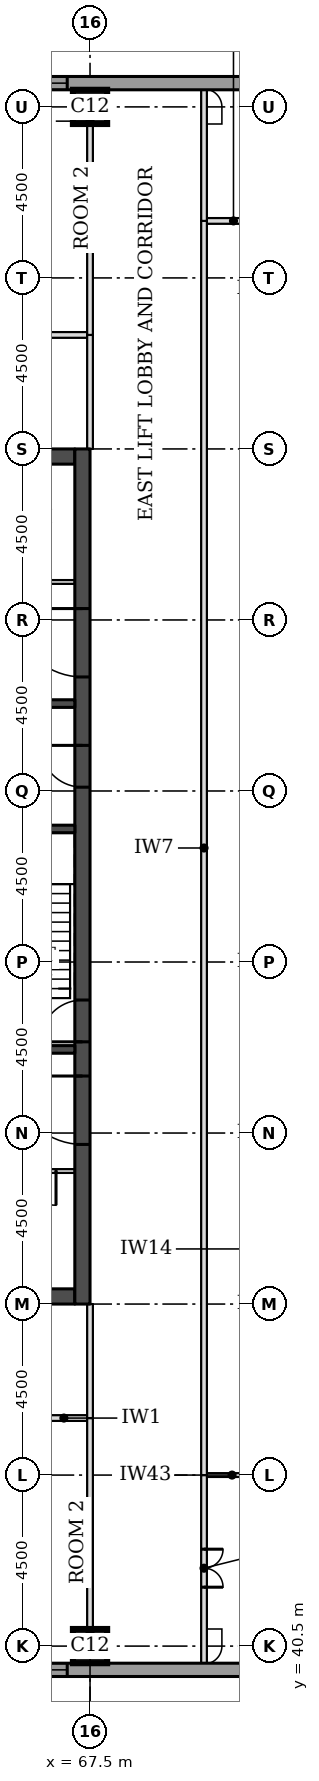
"""IFC4 building model, lengths in metres.
Left out: names, types, materials, properties, quantities, classifications, styles, units other than length and angle.
Written with IfcOpenShell. Run it as: python <this file> out.ifc"""

import sys

from ifc_helpers import new_model, si_unit, direction, frame, frame_2d, origin, origin_2d, place, context, subcontext, project, spatial, rectangle, extrude, element, fill, save


model = new_model("IFC4")
c1 = context("Model", 3, precision=1e-05, world=origin(), true_north=direction((0.0, 1.0)))
c2 = subcontext(c1, "Body", "Model", "MODEL_VIEW")
j1 = project(units=[si_unit("LENGTHUNIT", "METRE"), si_unit("PLANEANGLEUNIT", "RADIAN")], contexts=[c1])
p1 = place(None, origin())
s1 = spatial("IfcSite", under=j1, at=p1, CompositionType="ELEMENT")
p2 = place(p1, origin())
s2 = spatial("IfcBuilding", under=s1, at=p2, CompositionType="ELEMENT")
p3 = place(p2, frame((0.0, 0.0, 147.7)))
s3 = spatial("IfcBuildingStorey", under=s2, at=p3, CompositionType="ELEMENT", Elevation=147.7)
for number, where, z_axis, x_axis in (
    (1, (67.5, 40.5, 0.0), (0.0, 0.0, 1.0), (1.0, 0.0, 0.0)),
    (2, (67.5, 81.0, 0.0), (0.0, 0.0, 1.0), (1.0, 0.0, 0.0)),
):
    element("IfcColumn", number, at=place(p3, frame(where, z_axis=z_axis, x_axis=x_axis)), inside=s3, PredefinedType="COLUMN", context=c2, shape_type="SweptSolid", body=[
        extrude(rectangle(XDim=0.9, YDim=0.9, at=origin_2d()), origin(), (0.0, 0.0, 1.0), 3.7),
    ])
for number, where, z_axis, x_axis in (
    (3, (45.4, 49.7, 0.0), (0.0, 0.0, 1.0), (1.0, 0.0, 0.0)),
    (4, (45.4, 71.8, 0.0), (0.0, 0.0, 1.0), (1.0, 0.0, 0.0)),
):
    element("IfcWall", number, at=place(p3, frame(where, z_axis=z_axis, x_axis=x_axis)), inside=s3, PredefinedType="SHEAR", context=c2, shape_type="SweptSolid", body=[
        extrude(rectangle(XDim=21.7, YDim=0.4, at=frame_2d((10.85, 0.0))), origin(), (0.0, 0.0, 1.0), 3.7),
    ])
p4 = place(p3, frame((67.3, 49.5, 0.0), z_axis=(0.0, 0.0, 1.0), x_axis=(0.0, 1.0, 0.0)))
e5 = element("IfcWall", 5, at=p4, inside=s3, PredefinedType="SHEAR", context=c2, shape_type="SweptSolid", body=[
    extrude(rectangle(XDim=22.5, YDim=0.4, at=frame_2d((11.25, 0.0))), origin(), (0.0, 0.0, 1.0), 3.7),
])
p5 = place(p4, frame((4.2, 0.0, 0.0)))
e6 = element("IfcOpeningElement", 6, at=p5, cuts=e5, PredefinedType="OPENING", context=c2, shape_type="SweptSolid", body=[
    extrude(rectangle(XDim=1.8, YDim=2.1, at=frame_2d((0.9, 1.05))), frame((0.0, 0.21, 0.0), z_axis=(0.0, -1.0, 0.0), x_axis=(1.0, 0.0, 0.0)), (0.0, 0.0, 1.0), 0.42),
])
p6 = place(p4, frame((6.9, 0.0, 0.0)))
e7 = element("IfcOpeningElement", 7, at=p6, cuts=e5, PredefinedType="OPENING", context=c2, shape_type="SweptSolid", body=[
    extrude(rectangle(XDim=1.1, YDim=2.1, at=frame_2d((0.55, 1.05))), frame((0.0, 0.21, 0.0), z_axis=(0.0, -1.0, 0.0), x_axis=(1.0, 0.0, 0.0)), (0.0, 0.0, 1.0), 0.42),
])
p7 = place(p4, frame((13.6, 0.0, 0.0)))
e8 = element("IfcOpeningElement", 8, at=p7, cuts=e5, PredefinedType="OPENING", context=c2, shape_type="SweptSolid", body=[
    extrude(rectangle(XDim=1.1, YDim=2.1, at=frame_2d((0.55, 1.05))), frame((0.0, 0.21, 0.0), z_axis=(0.0, -1.0, 0.0), x_axis=(1.0, 0.0, 0.0)), (0.0, 0.0, 1.0), 0.42),
])
p8 = place(p4, frame((16.5, 0.0, 0.0)))
e9 = element("IfcOpeningElement", 9, at=p8, cuts=e5, PredefinedType="OPENING", context=c2, shape_type="SweptSolid", body=[
    extrude(rectangle(XDim=1.8, YDim=2.1, at=frame_2d((0.9, 1.05))), frame((0.0, 0.21, 0.0), z_axis=(0.0, -1.0, 0.0), x_axis=(1.0, 0.0, 0.0)), (0.0, 0.0, 1.0), 0.42),
])
p9 = place(p3, frame((36.0, 39.875, 0.0), z_axis=(0.0, 0.0, 1.0), x_axis=(1.0, 0.0, 0.0)))
e10 = element("IfcWall", 10, at=p9, inside=s3, PredefinedType="STANDARD", context=c2, shape_type="SweptSolid", body=[
    extrude(rectangle(XDim=36.331, YDim=0.35, at=frame_2d((18.166, 0.0))), origin(), (0.0, 0.0, 1.0), 3.525),
])
p10 = place(p9, frame((5.1, 0.0, 0.9)))
e11 = element("IfcOpeningElement", 11, at=p10, cuts=e10, PredefinedType="OPENING", context=c2, shape_type="SweptSolid", body=[
    extrude(rectangle(XDim=3.3, YDim=1.9, at=frame_2d((1.65, 0.95))), frame((0.0, 0.185, 0.0), z_axis=(0.0, -1.0, 0.0), x_axis=(1.0, 0.0, 0.0)), (0.0, 0.0, 1.0), 0.37),
])
p11 = place(p9, frame((9.6, 0.0, 0.9)))
e12 = element("IfcOpeningElement", 12, at=p11, cuts=e10, PredefinedType="OPENING", context=c2, shape_type="SweptSolid", body=[
    extrude(rectangle(XDim=3.3, YDim=1.9, at=frame_2d((1.65, 0.95))), frame((0.0, 0.185, 0.0), z_axis=(0.0, -1.0, 0.0), x_axis=(1.0, 0.0, 0.0)), (0.0, 0.0, 1.0), 0.37),
])
p12 = place(p9, frame((14.1, 0.0, 0.9)))
e13 = element("IfcOpeningElement", 13, at=p12, cuts=e10, PredefinedType="OPENING", context=c2, shape_type="SweptSolid", body=[
    extrude(rectangle(XDim=3.3, YDim=1.9, at=frame_2d((1.65, 0.95))), frame((0.0, 0.185, 0.0), z_axis=(0.0, -1.0, 0.0), x_axis=(1.0, 0.0, 0.0)), (0.0, 0.0, 1.0), 0.37),
])
p13 = place(p9, frame((18.6, 0.0, 0.9)))
e14 = element("IfcOpeningElement", 14, at=p13, cuts=e10, PredefinedType="OPENING", context=c2, shape_type="SweptSolid", body=[
    extrude(rectangle(XDim=3.3, YDim=1.9, at=frame_2d((1.65, 0.95))), frame((0.0, 0.185, 0.0), z_axis=(0.0, -1.0, 0.0), x_axis=(1.0, 0.0, 0.0)), (0.0, 0.0, 1.0), 0.37),
])
p14 = place(p9, frame((23.1, 0.0, 0.9)))
e15 = element("IfcOpeningElement", 15, at=p14, cuts=e10, PredefinedType="OPENING", context=c2, shape_type="SweptSolid", body=[
    extrude(rectangle(XDim=3.3, YDim=1.9, at=frame_2d((1.65, 0.95))), frame((0.0, 0.185, 0.0), z_axis=(0.0, -1.0, 0.0), x_axis=(1.0, 0.0, 0.0)), (0.0, 0.0, 1.0), 0.37),
])
p15 = place(p9, frame((27.6, 0.0, 0.9)))
e16 = element("IfcOpeningElement", 16, at=p15, cuts=e10, PredefinedType="OPENING", context=c2, shape_type="SweptSolid", body=[
    extrude(rectangle(XDim=3.3, YDim=1.9, at=frame_2d((1.65, 0.95))), frame((0.0, 0.185, 0.0), z_axis=(0.0, -1.0, 0.0), x_axis=(1.0, 0.0, 0.0)), (0.0, 0.0, 1.0), 0.37),
])
p16 = place(p3, frame((72.331, 81.625, 0.0), z_axis=(0.0, 0.0, 1.0), x_axis=(-1.0, 0.0, 0.0)))
e17 = element("IfcWall", 17, at=p16, inside=s3, PredefinedType="STANDARD", context=c2, shape_type="SweptSolid", body=[
    extrude(rectangle(XDim=32.163, YDim=0.35, at=frame_2d((16.081, 0.0))), origin(), (0.0, 0.0, 1.0), 3.525),
])
p17 = place(p16, frame((5.431, 0.0, 0.9)))
e18 = element("IfcOpeningElement", 18, at=p17, cuts=e17, PredefinedType="OPENING", context=c2, shape_type="SweptSolid", body=[
    extrude(rectangle(XDim=3.3, YDim=1.9, at=frame_2d((1.65, 0.95))), frame((0.0, 0.185, 0.0), z_axis=(0.0, -1.0, 0.0), x_axis=(1.0, 0.0, 0.0)), (0.0, 0.0, 1.0), 0.37),
])
p18 = place(p16, frame((9.931, 0.0, 0.9)))
e19 = element("IfcOpeningElement", 19, at=p18, cuts=e17, PredefinedType="OPENING", context=c2, shape_type="SweptSolid", body=[
    extrude(rectangle(XDim=3.3, YDim=1.9, at=frame_2d((1.65, 0.95))), frame((0.0, 0.185, 0.0), z_axis=(0.0, -1.0, 0.0), x_axis=(1.0, 0.0, 0.0)), (0.0, 0.0, 1.0), 0.37),
])
p19 = place(p16, frame((14.431, 0.0, 0.9)))
e20 = element("IfcOpeningElement", 20, at=p19, cuts=e17, PredefinedType="OPENING", context=c2, shape_type="SweptSolid", body=[
    extrude(rectangle(XDim=3.3, YDim=1.9, at=frame_2d((1.65, 0.95))), frame((0.0, 0.185, 0.0), z_axis=(0.0, -1.0, 0.0), x_axis=(1.0, 0.0, 0.0)), (0.0, 0.0, 1.0), 0.37),
])
p20 = place(p16, frame((18.931, 0.0, 0.9)))
e21 = element("IfcOpeningElement", 21, at=p20, cuts=e17, PredefinedType="OPENING", context=c2, shape_type="SweptSolid", body=[
    extrude(rectangle(XDim=3.3, YDim=1.9, at=frame_2d((1.65, 0.95))), frame((0.0, 0.185, 0.0), z_axis=(0.0, -1.0, 0.0), x_axis=(1.0, 0.0, 0.0)), (0.0, 0.0, 1.0), 0.37),
])
p21 = place(p16, frame((23.431, 0.0, 0.9)))
e22 = element("IfcOpeningElement", 22, at=p21, cuts=e17, PredefinedType="OPENING", context=c2, shape_type="SweptSolid", body=[
    extrude(rectangle(XDim=3.3, YDim=1.9, at=frame_2d((1.65, 0.95))), frame((0.0, 0.185, 0.0), z_axis=(0.0, -1.0, 0.0), x_axis=(1.0, 0.0, 0.0)), (0.0, 0.0, 1.0), 0.37),
])
p22 = place(p3, frame((70.575, 45.0, 0.0), z_axis=(0.0, 0.0, 1.0), x_axis=(1.0, 0.0, 0.0)))
e23 = element("IfcWall", 23, at=p22, inside=s3, PredefinedType="PARTITIONING", context=c2, shape_type="SweptSolid", body=[
    extrude(rectangle(XDim=2.925, YDim=0.1, at=frame_2d((1.462, 0.0))), origin(), (0.0, 0.0, 1.0), 3.096),
])
p23 = place(p22, frame((1.0, 0.0, 0.0)))
e24 = element("IfcOpeningElement", 24, at=p23, cuts=e23, PredefinedType="OPENING", context=c2, shape_type="SweptSolid", body=[
    extrude(rectangle(XDim=0.9, YDim=2.1, at=frame_2d((0.45, 1.05))), frame((0.0, 0.06, 0.0), z_axis=(0.0, -1.0, 0.0), x_axis=(1.0, 0.0, 0.0)), (0.0, 0.0, 1.0), 0.12),
])
p24 = place(p3, frame((63.0, 46.5, 0.0), z_axis=(0.0, 0.0, 1.0), x_axis=(1.0, 0.0, 0.0)))
e25 = element("IfcWall", 25, at=p24, inside=s3, PredefinedType="PARTITIONING", context=c2, shape_type="SweptSolid", body=[
    extrude(rectangle(XDim=4.425, YDim=0.15, at=frame_2d((2.212, 0.0))), origin(), (0.0, 0.0, 1.0), 3.55),
])
p25 = place(p24, frame((1.75, 0.0, 0.0)))
e26 = element("IfcOpeningElement", 26, at=p25, cuts=e25, PredefinedType="OPENING", context=c2, shape_type="SweptSolid", body=[
    extrude(rectangle(XDim=0.9, YDim=2.1, at=frame_2d((0.45, 1.05))), frame((0.0, 0.085, 0.0), z_axis=(0.0, -1.0, 0.0), x_axis=(1.0, 0.0, 0.0)), (0.0, 0.0, 1.0), 0.17),
])
p26 = place(p3, frame((63.0, 75.0, 0.0), z_axis=(0.0, 0.0, 1.0), x_axis=(1.0, 0.0, 0.0)))
e27 = element("IfcWall", 27, at=p26, inside=s3, PredefinedType="PARTITIONING", context=c2, shape_type="SweptSolid", body=[
    extrude(rectangle(XDim=4.425, YDim=0.15, at=frame_2d((2.212, 0.0))), origin(), (0.0, 0.0, 1.0), 3.55),
])
p27 = place(p26, frame((1.75, 0.0, 0.0)))
e28 = element("IfcOpeningElement", 28, at=p27, cuts=e27, PredefinedType="OPENING", context=c2, shape_type="SweptSolid", body=[
    extrude(rectangle(XDim=0.9, YDim=2.1, at=frame_2d((0.45, 1.05))), frame((0.0, 0.085, 0.0), z_axis=(0.0, -1.0, 0.0), x_axis=(1.0, 0.0, 0.0)), (0.0, 0.0, 1.0), 0.17),
])
p28 = place(p3, frame((70.575, 78.0, 0.0), z_axis=(0.0, 0.0, 1.0), x_axis=(1.0, 0.0, 0.0)))
e29 = element("IfcWall", 29, at=p28, inside=s3, PredefinedType="PARTITIONING", context=c2, shape_type="SweptSolid", body=[
    extrude(rectangle(XDim=3.0, YDim=0.15, at=frame_2d((1.5, 0.0))), origin(), (0.0, 0.0, 1.0), 3.55),
])
p29 = place(p28, frame((1.05, 0.0, 0.0)))
e30 = element("IfcOpeningElement", 30, at=p29, cuts=e29, PredefinedType="OPENING", context=c2, shape_type="SweptSolid", body=[
    extrude(rectangle(XDim=0.9, YDim=2.1, at=frame_2d((0.45, 1.05))), frame((0.0, 0.085, 0.0), z_axis=(0.0, -1.0, 0.0), x_axis=(1.0, 0.0, 0.0)), (0.0, 0.0, 1.0), 0.17),
])
p30 = place(p3, frame((67.5, 40.05, 0.0), z_axis=(0.0, 0.0, 1.0), x_axis=(0.0, 1.0, 0.0)))
e31 = element("IfcWall", 31, at=p30, inside=s3, PredefinedType="PARTITIONING", context=c2, shape_type="SweptSolid", body=[
    extrude(rectangle(XDim=6.45, YDim=0.15, at=frame_2d((3.225, 0.0))), origin(), (0.0, 0.0, 1.0), 3.022),
])
p31 = place(p3, frame((70.5, 40.05, 0.0), z_axis=(0.0, 0.0, 1.0), x_axis=(0.0, 1.0, 0.0)))
e32 = element("IfcWall", 32, at=p31, inside=s3, PredefinedType="PARTITIONING", context=c2, shape_type="SweptSolid", body=[
    extrude(rectangle(XDim=4.95, YDim=0.15, at=frame_2d((2.475, 0.0))), origin(), (0.0, 0.0, 1.0), 3.55),
])
p32 = place(p31, frame((2.0, 0.0, 0.0)))
e33 = element("IfcOpeningElement", 33, at=p32, cuts=e32, PredefinedType="OPENING", context=c2, shape_type="SweptSolid", body=[
    extrude(rectangle(XDim=1.0, YDim=2.1, at=frame_2d((0.5, 1.05))), frame((0.0, 0.085, 0.0), z_axis=(0.0, -1.0, 0.0), x_axis=(1.0, 0.0, 0.0)), (0.0, 0.0, 1.0), 0.17),
])
p33 = place(p3, frame((70.5, 45.0, 0.0), z_axis=(0.0, 0.0, 1.0), x_axis=(0.0, 1.0, 0.0)))
e34 = element("IfcWall", 34, at=p33, inside=s3, PredefinedType="PARTITIONING", context=c2, shape_type="SweptSolid", body=[
    extrude(rectangle(XDim=33.0, YDim=0.15, at=frame_2d((16.5, 0.0))), origin(), (0.0, 0.0, 1.0), 3.55),
])
for number, where, z_axis, x_axis in (
    (35, (67.5, 46.5, 0.0), (0.0, 0.0, 1.0), (0.0, 1.0, 0.0)),
    (36, (67.5, 72.0, 0.0), (0.0, 0.0, 1.0), (0.0, 1.0, 0.0)),
):
    element("IfcWall", number, at=place(p3, frame(where, z_axis=z_axis, x_axis=x_axis)), inside=s3, PredefinedType="PARTITIONING", context=c2, shape_type="SweptSolid", body=[
        extrude(rectangle(XDim=3.0, YDim=0.15, at=frame_2d((1.5, 0.0))), origin(), (0.0, 0.0, 1.0), 3.022),
    ])
p34 = place(p3, frame((67.5, 75.0, 0.0), z_axis=(0.0, 0.0, 1.0), x_axis=(0.0, 1.0, 0.0)))
e37 = element("IfcWall", 37, at=p34, inside=s3, PredefinedType="PARTITIONING", context=c2, shape_type="SweptSolid", body=[
    extrude(rectangle(XDim=6.45, YDim=0.15, at=frame_2d((3.225, 0.0))), origin(), (0.0, 0.0, 1.0), 3.022),
])
p35 = place(p3, frame((70.5, 78.0, 0.0), z_axis=(0.0, 0.0, 1.0), x_axis=(0.0, 1.0, 0.0)))
e38 = element("IfcWall", 38, at=p35, inside=s3, PredefinedType="PARTITIONING", context=c2, shape_type="SweptSolid", body=[
    extrude(rectangle(XDim=3.45, YDim=0.15, at=frame_2d((1.725, 0.0))), origin(), (0.0, 0.0, 1.0), 3.55),
])
p36 = place(p3, frame((45.4, 53.0, 0.0), z_axis=(0.0, 0.0, 1.0), x_axis=(1.0, 0.0, 0.0)))
e39 = element("IfcWall", 39, at=p36, inside=s3, PredefinedType="PARTITIONING", context=c2, shape_type="SweptSolid", body=[
    extrude(rectangle(XDim=21.7, YDim=0.1, at=frame_2d((10.85, 0.0))), origin(), (0.0, 0.0, 1.0), 3.55),
])
p37 = place(p36, frame((20.305, 0.0, 0.0)))
e40 = element("IfcOpeningElement", 40, at=p37, cuts=e39, PredefinedType="OPENING", context=c2, shape_type="SweptSolid", body=[
    extrude(rectangle(XDim=0.9, YDim=2.1, at=frame_2d((0.45, 1.05))), frame((0.0, 0.06, 0.0), z_axis=(0.0, -1.0, 0.0), x_axis=(1.0, 0.0, 0.0)), (0.0, 0.0, 1.0), 0.12),
])
p38 = place(p36, frame((17.68, 0.0, 0.0)))
e41 = element("IfcOpeningElement", 41, at=p38, cuts=e39, PredefinedType="OPENING", context=c2, shape_type="SweptSolid", body=[
    extrude(rectangle(XDim=0.9, YDim=2.1, at=frame_2d((0.45, 1.05))), frame((0.0, 0.06, 0.0), z_axis=(0.0, -1.0, 0.0), x_axis=(1.0, 0.0, 0.0)), (0.0, 0.0, 1.0), 0.12),
])
p39 = place(p36, frame((0.442, 0.0, 0.0)))
e42 = element("IfcOpeningElement", 42, at=p39, cuts=e39, PredefinedType="OPENING", context=c2, shape_type="SweptSolid", body=[
    extrude(rectangle(XDim=0.9, YDim=2.1, at=frame_2d((0.45, 1.05))), frame((0.0, 0.06, 0.0), z_axis=(0.0, -1.0, 0.0), x_axis=(1.0, 0.0, 0.0)), (0.0, 0.0, 1.0), 0.12),
])
p40 = place(p36, frame((2.201, 0.0, 0.0)))
e43 = element("IfcOpeningElement", 43, at=p40, cuts=e39, PredefinedType="OPENING", context=c2, shape_type="SweptSolid", body=[
    extrude(rectangle(XDim=0.9, YDim=2.1, at=frame_2d((0.45, 1.05))), frame((0.0, 0.06, 0.0), z_axis=(0.0, -1.0, 0.0), x_axis=(1.0, 0.0, 0.0)), (0.0, 0.0, 1.0), 0.12),
])
p41 = place(p36, frame((3.884, 0.0, 0.0)))
e44 = element("IfcOpeningElement", 44, at=p41, cuts=e39, PredefinedType="OPENING", context=c2, shape_type="SweptSolid", body=[
    extrude(rectangle(XDim=1.0, YDim=2.1, at=frame_2d((0.5, 1.05))), frame((0.0, 0.06, 0.0), z_axis=(0.0, -1.0, 0.0), x_axis=(1.0, 0.0, 0.0)), (0.0, 0.0, 1.0), 0.12),
])
p42 = place(p36, frame((7.32, 0.0, 0.0)))
e45 = element("IfcOpeningElement", 45, at=p42, cuts=e39, PredefinedType="OPENING", context=c2, shape_type="SweptSolid", body=[
    extrude(rectangle(XDim=0.9, YDim=2.1, at=frame_2d((0.45, 1.05))), frame((0.0, 0.06, 0.0), z_axis=(0.0, -1.0, 0.0), x_axis=(1.0, 0.0, 0.0)), (0.0, 0.0, 1.0), 0.12),
])
p43 = place(p36, frame((12.92, 0.0, 0.0)))
e46 = element("IfcOpeningElement", 46, at=p43, cuts=e39, PredefinedType="OPENING", context=c2, shape_type="SweptSolid", body=[
    extrude(rectangle(XDim=0.9, YDim=2.1, at=frame_2d((0.45, 1.05))), frame((0.0, 0.06, 0.0), z_axis=(0.0, -1.0, 0.0), x_axis=(1.0, 0.0, 0.0)), (0.0, 0.0, 1.0), 0.12),
])
p44 = place(p3, frame((63.9, 56.2, 0.0), z_axis=(0.0, 0.0, 1.0), x_axis=(1.0, 0.0, 0.0)))
e47 = element("IfcWall", 47, at=p44, inside=s3, PredefinedType="SOLIDWALL", context=c2, shape_type="SweptSolid", body=[
    extrude(rectangle(XDim=3.2, YDim=0.2, at=frame_2d((1.6, 0.0))), origin(), (0.0, 0.0, 1.0), 3.55),
])
p45 = place(p3, frame((61.85, 62.0, 0.0), z_axis=(0.0, 0.0, 1.0), x_axis=(1.0, 0.0, 0.0)))
e48 = element("IfcWall", 48, at=p45, inside=s3, PredefinedType="SOLIDWALL", context=c2, shape_type="SweptSolid", body=[
    extrude(rectangle(XDim=5.25, YDim=0.2, at=frame_2d((2.625, 0.0))), origin(), (0.0, 0.0, 1.0), 3.55),
])
p46 = place(p3, frame((64.7, 65.3, 0.0), z_axis=(0.0, 0.0, 1.0), x_axis=(1.0, 0.0, 0.0)))
e49 = element("IfcWall", 49, at=p46, inside=s3, PredefinedType="SOLIDWALL", context=c2, shape_type="SweptSolid", body=[
    extrude(rectangle(XDim=2.4, YDim=0.2, at=frame_2d((1.2, 0.0))), origin(), (0.0, 0.0, 1.0), 3.55),
])
p47 = place(p3, frame((45.4, 68.5, 0.0), z_axis=(0.0, 0.0, 1.0), x_axis=(1.0, 0.0, 0.0)))
e50 = element("IfcWall", 50, at=p47, inside=s3, PredefinedType="PARTITIONING", context=c2, shape_type="SweptSolid", body=[
    extrude(rectangle(XDim=21.7, YDim=0.1, at=frame_2d((10.85, 0.0))), origin(), (0.0, 0.0, 1.0), 3.55),
])
p48 = place(p47, frame((18.625, 0.0, 0.0)))
e51 = element("IfcOpeningElement", 51, at=p48, cuts=e50, PredefinedType="OPENING", context=c2, shape_type="SweptSolid", body=[
    extrude(rectangle(XDim=0.9, YDim=2.1, at=frame_2d((0.45, 1.05))), frame((0.0, 0.06, 0.0), z_axis=(0.0, -1.0, 0.0), x_axis=(1.0, 0.0, 0.0)), (0.0, 0.0, 1.0), 0.12),
])
p49 = place(p47, frame((1.073, 0.0, 0.0)))
e52 = element("IfcOpeningElement", 52, at=p49, cuts=e50, PredefinedType="OPENING", context=c2, shape_type="SweptSolid", body=[
    extrude(rectangle(XDim=0.9, YDim=2.1, at=frame_2d((0.45, 1.05))), frame((0.0, 0.06, 0.0), z_axis=(0.0, -1.0, 0.0), x_axis=(1.0, 0.0, 0.0)), (0.0, 0.0, 1.0), 0.12),
])
p50 = place(p47, frame((3.698, 0.0, 0.0)))
e53 = element("IfcOpeningElement", 53, at=p50, cuts=e50, PredefinedType="OPENING", context=c2, shape_type="SweptSolid", body=[
    extrude(rectangle(XDim=0.9, YDim=2.1, at=frame_2d((0.45, 1.05))), frame((0.0, 0.06, 0.0), z_axis=(0.0, -1.0, 0.0), x_axis=(1.0, 0.0, 0.0)), (0.0, 0.0, 1.0), 0.12),
])
p51 = place(p47, frame((13.48, 0.0, 0.0)))
e54 = element("IfcOpeningElement", 54, at=p51, cuts=e50, PredefinedType="OPENING", context=c2, shape_type="SweptSolid", body=[
    extrude(rectangle(XDim=0.9, YDim=2.1, at=frame_2d((0.45, 1.05))), frame((0.0, 0.06, 0.0), z_axis=(0.0, -1.0, 0.0), x_axis=(1.0, 0.0, 0.0)), (0.0, 0.0, 1.0), 0.12),
])
p52 = place(p47, frame((7.88, 0.0, 0.0)))
e55 = element("IfcOpeningElement", 55, at=p52, cuts=e50, PredefinedType="OPENING", context=c2, shape_type="SweptSolid", body=[
    extrude(rectangle(XDim=0.9, YDim=2.1, at=frame_2d((0.45, 1.05))), frame((0.0, 0.06, 0.0), z_axis=(0.0, -1.0, 0.0), x_axis=(1.0, 0.0, 0.0)), (0.0, 0.0, 1.0), 0.12),
])
p53 = place(p15, origin())
e56 = element("IfcWindow", 56, at=p53, inside=s3, PartitioningType="SINGLE_PANEL", PredefinedType="WINDOW", context=c2, shape_type="SweptSolid", body=[
    extrude(rectangle(XDim=3.3, YDim=1.9, at=frame_2d((1.65, 0.95))), frame((0.0, 0.085, 0.0), z_axis=(0.0, -1.0, 0.0), x_axis=(1.0, 0.0, 0.0)), (0.0, 0.0, 1.0), 0.06),
])
fill(e16, e56)
p54 = place(p17, origin())
e57 = element("IfcWindow", 57, at=p54, inside=s3, PartitioningType="SINGLE_PANEL", PredefinedType="WINDOW", context=c2, shape_type="SweptSolid", body=[
    extrude(rectangle(XDim=3.3, YDim=1.9, at=frame_2d((1.65, 0.95))), frame((0.0, 0.085, 0.0), z_axis=(0.0, -1.0, 0.0), x_axis=(1.0, 0.0, 0.0)), (0.0, 0.0, 1.0), 0.06),
])
fill(e18, e57)
p55 = place(p32, frame((1.0, 0.0, 0.0), z_axis=(0.0, 0.0, 1.0), x_axis=(-1.0, 0.0, 0.0)))
e58 = element("IfcDoor", 58, at=p55, inside=s3, OperationType="DOUBLE_DOOR_SINGLE_SWING", PredefinedType="DOOR", context=c2, shape_type="SweptSolid", body=[
    extrude(rectangle(XDim=1.0, YDim=2.1, at=frame_2d((0.5, 1.05))), frame((0.0, 0.025, 0.0), z_axis=(0.0, -1.0, 0.0), x_axis=(1.0, 0.0, 0.0)), (0.0, 0.0, 1.0), 0.05),
])
fill(e33, e58)
p56 = place(p5, origin())
e59 = element("IfcDoor", 59, at=p56, inside=s3, OperationType="SINGLE_SWING_RIGHT", PredefinedType="DOOR", context=c2, shape_type="SweptSolid", body=[
    extrude(rectangle(XDim=1.8, YDim=2.1, at=frame_2d((0.9, 1.05))), frame((0.0, 0.025, 0.0), z_axis=(0.0, -1.0, 0.0), x_axis=(1.0, 0.0, 0.0)), (0.0, 0.0, 1.0), 0.05),
])
fill(e6, e59)
p57 = place(p6, origin())
e60 = element("IfcDoor", 60, at=p57, inside=s3, OperationType="SINGLE_SWING_LEFT", PredefinedType="DOOR", context=c2, shape_type="SweptSolid", body=[
    extrude(rectangle(XDim=1.1, YDim=2.1, at=frame_2d((0.55, 1.05))), frame((0.0, 0.025, 0.0), z_axis=(0.0, -1.0, 0.0), x_axis=(1.0, 0.0, 0.0)), (0.0, 0.0, 1.0), 0.05),
])
fill(e7, e60)
p58 = place(p7, origin())
e61 = element("IfcDoor", 61, at=p58, inside=s3, OperationType="SINGLE_SWING_RIGHT", PredefinedType="DOOR", context=c2, shape_type="SweptSolid", body=[
    extrude(rectangle(XDim=1.1, YDim=2.1, at=frame_2d((0.55, 1.05))), frame((0.0, 0.025, 0.0), z_axis=(0.0, -1.0, 0.0), x_axis=(1.0, 0.0, 0.0)), (0.0, 0.0, 1.0), 0.05),
])
fill(e8, e61)
p59 = place(p8, origin())
e62 = element("IfcDoor", 62, at=p59, inside=s3, OperationType="SINGLE_SWING_RIGHT", PredefinedType="DOOR", context=c2, shape_type="SweptSolid", body=[
    extrude(rectangle(XDim=1.8, YDim=2.1, at=frame_2d((0.9, 1.05))), frame((0.0, 0.025, 0.0), z_axis=(0.0, -1.0, 0.0), x_axis=(1.0, 0.0, 0.0)), (0.0, 0.0, 1.0), 0.05),
])
fill(e9, e62)
p60 = place(p37, frame((0.9, 0.0, 0.0), z_axis=(0.0, 0.0, 1.0), x_axis=(-1.0, 0.0, 0.0)))
e63 = element("IfcDoor", 63, at=p60, inside=s3, OperationType="SINGLE_SWING_LEFT", PredefinedType="DOOR", context=c2, shape_type="SweptSolid", body=[
    extrude(rectangle(XDim=0.9, YDim=2.1, at=frame_2d((0.45, 1.05))), frame((0.0, 0.025, 0.0), z_axis=(0.0, -1.0, 0.0), x_axis=(1.0, 0.0, 0.0)), (0.0, 0.0, 1.0), 0.05),
])
fill(e40, e63)
save(model, sys.argv[1])
